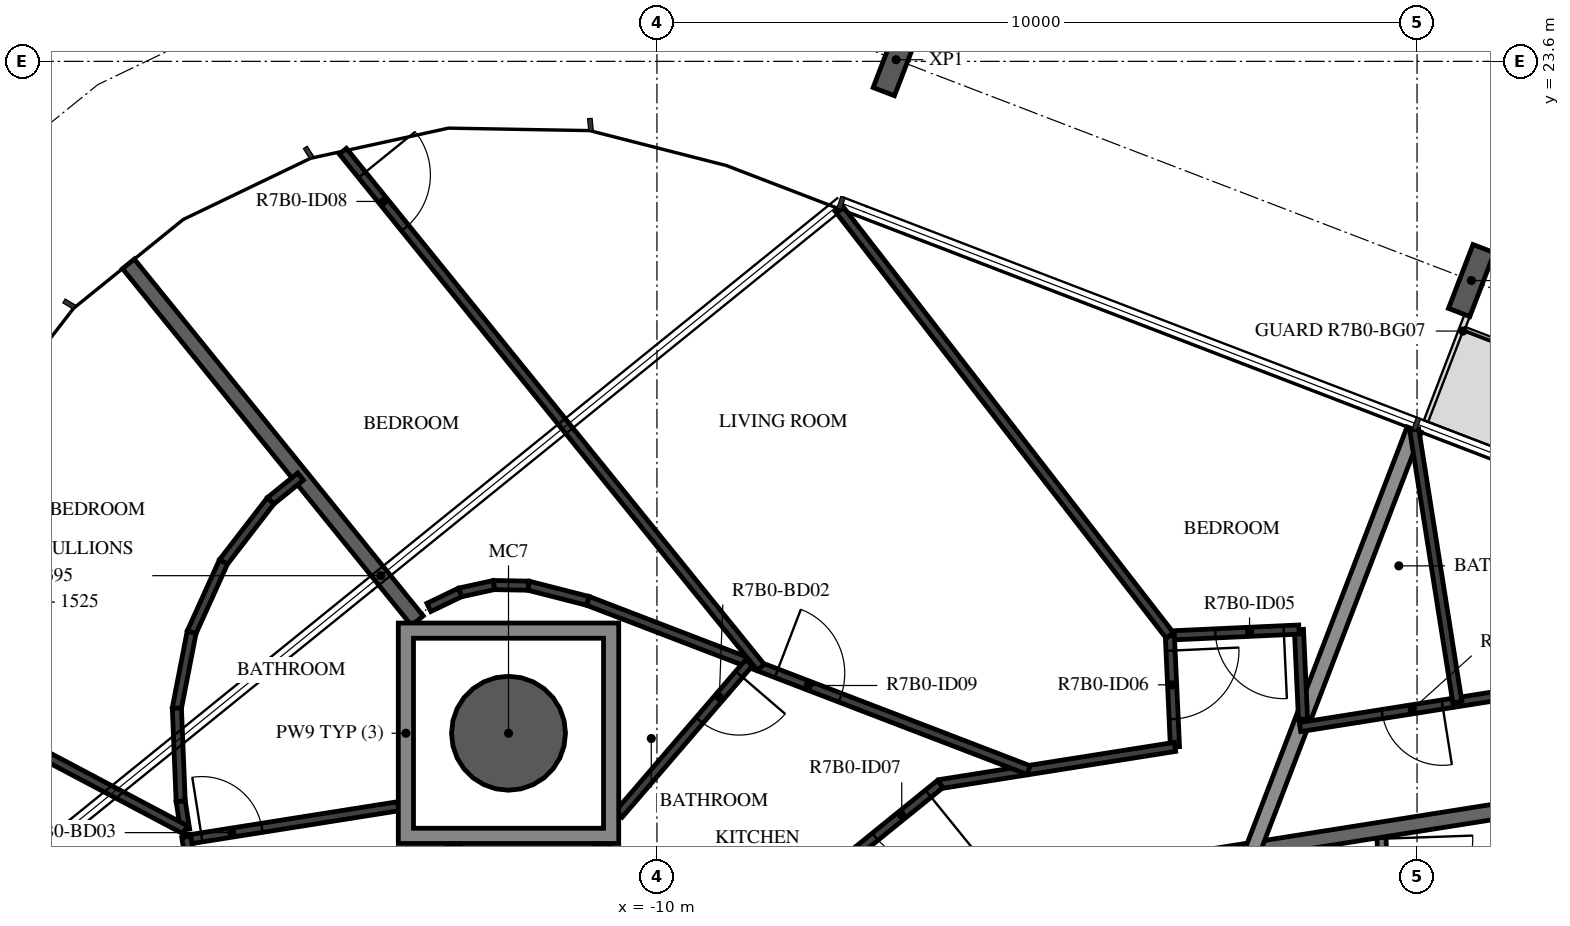
"""IFC4 building model, lengths in metres.
Left out: names, types, materials, properties, quantities, classifications, styles, units other than length and angle.
Written with IfcOpenShell. Run it as: python <this file> out.ifc"""

import sys

from ifc_helpers import new_model, si_unit, direction, frame, frame_2d, origin, origin_2d, place, context, subcontext, project, spatial, polyline, rectangle, hollow_circle, i_section, outline, extrude, element, fill, save


model = new_model("IFC4")
c1 = context("Model", 3, precision=1e-05, world=origin(), true_north=direction((0.0, 1.0)))
c2 = subcontext(c1, "Body", "Model", "MODEL_VIEW")
j1 = project(units=[si_unit("LENGTHUNIT", "METRE"), si_unit("PLANEANGLEUNIT", "RADIAN")], contexts=[c1])
p1 = place(None, origin())
s1 = spatial("IfcSite", under=j1, at=p1, CompositionType="ELEMENT")
p2 = place(p1, origin())
s2 = spatial("IfcBuilding", under=s1, at=p2, CompositionType="ELEMENT")
p3 = place(p2, frame((0.0, 0.0, 277.4)))
s3 = spatial("IfcBuildingStorey", under=s2, at=p3, CompositionType="ELEMENT", Elevation=277.4)
p4 = place(p3, frame((-11.953, 14.76, -0.38), z_axis=(0.0, 0.0, 1.0), x_axis=(1.0, 0.0, 0.0)))
e1 = element("IfcColumn", 1, at=p4, inside=s3, PredefinedType="COLUMN", context=c2, shape_type="SweptSolid", body=[
    extrude(hollow_circle(Radius=0.75, WallThickness=0.035, at=origin_2d()), origin(), (0.0, 0.0, 1.0), 3.5),
])
for number, where, z_axis, x_axis in (
    (2, (0.715, 20.716, -0.38), (0.0, 0.0, 1.0), (0.934, -0.358, 0.0)),
    (3, (-6.854, 23.622, -0.38), (0.0, 0.0, 1.0), (0.934, -0.358, 0.0)),
):
    element("IfcColumn", number, at=place(p3, frame(where, z_axis=z_axis, x_axis=x_axis)), inside=s3, PredefinedType="COLUMN", context=c2, shape_type="SweptSolid", body=[
        extrude(i_section(OverallWidth=0.3, OverallDepth=0.9, WebThickness=0.019, FlangeThickness=0.035, FilletRadius=0.03, at=origin_2d()), origin(), (0.0, 0.0, 1.0), 3.5),
    ])
p5 = place(p3, frame((-0.471, 13.492, 0.0), z_axis=(0.0, 0.0, 1.0), x_axis=(0.034873173869, -0.999391745886, 0.0)))
e4 = element("IfcWall", 4, at=p5, inside=s3, PredefinedType="PARTITIONING", context=c2, shape_type="SweptSolid", body=[
    extrude(rectangle(XDim=1.596, YDim=0.12, at=frame_2d((0.798, 0.0))), origin(), (0.0, 0.0, 1.0), 3.12),
])
p6 = place(p5, frame((0.12, 0.0, 0.0)))
e5 = element("IfcOpeningElement", 5, at=p6, cuts=e4, PredefinedType="OPENING", context=c2, shape_type="SweptSolid", body=[
    extrude(rectangle(XDim=1.2, YDim=2.1, at=frame_2d((0.6, 1.05))), frame((0.0, 0.07, 0.0), z_axis=(0.0, -1.0, 0.0), x_axis=(1.0, 0.0, 0.0)), (0.0, 0.0, 1.0), 0.14),
])
p7 = place(p3, frame((1.45, 13.797, 0.0), z_axis=(0.0, 0.0, 1.0), x_axis=(-0.987690361611, -0.156421704315, 0.0)))
e6 = element("IfcWall", 6, at=p7, inside=s3, PredefinedType="STANDARD", context=c2, shape_type="SweptSolid", body=[
    extrude(rectangle(XDim=7.181, YDim=0.2, at=frame_2d((3.591, 0.0))), origin(), (0.0, 0.0, 1.0), 3.12),
])
p8 = place(p3, frame((-0.037, 18.756, 0.0), z_axis=(0.0, 0.0, 1.0), x_axis=(-0.358365943542, -0.933581196527, 0.0)))
e7 = element("IfcWall", 7, at=p8, inside=s3, PredefinedType="STANDARD", context=c2, shape_type="SweptSolid", body=[
    extrude(rectangle(XDim=5.924, YDim=0.2, at=frame_2d((2.962, 0.0))), origin(), (0.0, 0.0, 1.0), 2.73),
])
p9 = place(p3, frame((-10.779, 13.31, 0.0), z_axis=(0.0, 0.0, 1.0), x_axis=(0.62931692753, -0.777148766147, 0.0)))
e8 = element("IfcWall", 8, at=p9, inside=s3, PredefinedType="STANDARD", context=c2, shape_type="SweptSolid", body=[
    extrude(rectangle(XDim=3.727, YDim=0.2, at=frame_2d((1.864, 0.0))), origin(), (0.0, 0.0, 1.0), 3.12),
])
p10 = place(p3, frame((-16.953, 20.936, 0.0), z_axis=(0.0, 0.0, 1.0), x_axis=(0.629347053134, -0.77712437017, 0.0)))
e9 = element("IfcWall", 9, at=p10, inside=s3, PredefinedType="STANDARD", context=c2, shape_type="SweptSolid", body=[
    extrude(rectangle(XDim=6.04, YDim=0.2, at=frame_2d((3.02, 0.0))), origin(), (0.0, 0.0, 1.0), 3.12),
])
p11 = place(p3, frame((1.612, 15.341, 0.0), z_axis=(0.0, 0.0, 1.0), x_axis=(-0.987687176419, -0.156441815179, 0.0)))
e10 = element("IfcWall", 10, at=p11, inside=s3, PredefinedType="PARTITIONING", context=c2, shape_type="SweptSolid", body=[
    extrude(rectangle(XDim=3.191, YDim=0.12, at=frame_2d((1.596, 0.0))), origin(), (0.0, 0.0, 1.0), 3.12),
])
p12 = place(p11, frame((1.295, 0.0, 0.0)))
e11 = element("IfcOpeningElement", 11, at=p12, cuts=e10, PredefinedType="OPENING", context=c2, shape_type="SweptSolid", body=[
    extrude(rectangle(XDim=0.8, YDim=2.1, at=frame_2d((0.4, 1.05))), frame((0.0, 0.07, 0.0), z_axis=(0.0, -1.0, 0.0), x_axis=(1.0, 0.0, 0.0)), (0.0, 0.0, 1.0), 0.14),
])
p13 = place(p3, frame((-0.037, 18.756, 0.0), z_axis=(0.0, 0.0, 1.0), x_axis=(0.156421851095, -0.987690338365, 0.0)))
e12 = element("IfcWall", 12, at=p13, inside=s3, PredefinedType="PARTITIONING", context=c2, shape_type="SweptSolid", body=[
    extrude(rectangle(XDim=3.63, YDim=0.12, at=frame_2d((1.815, 0.0))), origin(), (0.0, 0.0, 1.0), 3.12),
])
p14 = place(p3, frame((-1.5, 14.946, 0.0), z_axis=(0.0, 0.0, 1.0), x_axis=(-0.045923747874, 0.998944948123, 0.0)))
e13 = element("IfcWall", 13, at=p14, inside=s3, PredefinedType="PARTITIONING", context=c2, shape_type="SweptSolid", body=[
    extrude(rectangle(XDim=1.18, YDim=0.12, at=frame_2d((0.59, 0.0))), origin(), (0.0, 0.0, 1.0), 3.12),
])
p15 = place(p3, frame((-1.554, 16.125, 0.0), z_axis=(0.0, 0.0, 1.0), x_axis=(-0.998943517875, -0.045954848436, 0.0)))
e14 = element("IfcWall", 14, at=p15, inside=s3, PredefinedType="PARTITIONING", context=c2, shape_type="SweptSolid", body=[
    extrude(rectangle(XDim=1.7, YDim=0.12, at=frame_2d((0.85, 0.0))), origin(), (0.0, 0.0, 1.0), 3.12),
])
p16 = place(p15, frame((0.2, 0.0, 0.0)))
e15 = element("IfcOpeningElement", 15, at=p16, cuts=e14, PredefinedType="OPENING", context=c2, shape_type="SweptSolid", body=[
    extrude(rectangle(XDim=0.9, YDim=2.1, at=frame_2d((0.45, 1.05))), frame((0.0, 0.07, 0.0), z_axis=(0.0, -1.0, 0.0), x_axis=(1.0, 0.0, 0.0)), (0.0, 0.0, 1.0), 0.14),
])
p17 = place(p3, frame((-3.252, 16.047, 0.0), z_axis=(0.0, 0.0, 1.0), x_axis=(0.045928493331, -0.998944729953, 0.0)))
e16 = element("IfcWall", 16, at=p17, inside=s3, PredefinedType="PARTITIONING", context=c2, shape_type="SweptSolid", body=[
    extrude(rectangle(XDim=1.467, YDim=0.12, at=frame_2d((0.733, 0.0))), origin(), (0.0, 0.0, 1.0), 3.12),
])
p18 = place(p17, frame((0.2, 0.0, 0.0)))
e17 = element("IfcOpeningElement", 17, at=p18, cuts=e16, PredefinedType="OPENING", context=c2, shape_type="SweptSolid", body=[
    extrude(rectangle(XDim=0.9, YDim=2.1, at=frame_2d((0.45, 1.05))), frame((0.0, 0.07, 0.0), z_axis=(0.0, -1.0, 0.0), x_axis=(1.0, 0.0, 0.0)), (0.0, 0.0, 1.0), 0.14),
])
p19 = place(p3, frame((-3.185, 14.581, 0.0), z_axis=(0.0, 0.0, 1.0), x_axis=(-0.987690712769, -0.156419486991, 0.0)))
e18 = element("IfcWall", 18, at=p19, inside=s3, PredefinedType="PARTITIONING", context=c2, shape_type="SweptSolid", body=[
    extrude(rectangle(XDim=3.128, YDim=0.12, at=frame_2d((1.564, 0.0))), origin(), (0.0, 0.0, 1.0), 3.12),
])
p20 = place(p3, frame((-6.274, 14.092, 0.0), z_axis=(0.0, 0.0, 1.0), x_axis=(-0.777162268892, -0.629300252511, 0.0)))
e19 = element("IfcWall", 19, at=p20, inside=s3, PredefinedType="PARTITIONING", context=c2, shape_type="SweptSolid", body=[
    extrude(rectangle(XDim=3.992, YDim=0.12, at=frame_2d((1.996, 0.0))), origin(), (0.0, 0.0, 1.0), 3.12),
])
p21 = place(p20, frame((0.2, 0.0, 0.0)))
e20 = element("IfcOpeningElement", 20, at=p21, cuts=e19, PredefinedType="OPENING", context=c2, shape_type="SweptSolid", body=[
    extrude(rectangle(XDim=0.9, YDim=2.1, at=frame_2d((0.45, 1.05))), frame((0.0, 0.07, 0.0), z_axis=(0.0, -1.0, 0.0), x_axis=(1.0, 0.0, 0.0)), (0.0, 0.0, 1.0), 0.14),
])
p22 = place(p3, frame((-7.606, 21.661, 0.0), z_axis=(0.0, 0.0, 1.0), x_axis=(0.612852858705, -0.79019704731, 0.0)))
e21 = element("IfcWall", 21, at=p22, inside=s3, PredefinedType="PARTITIONING", context=c2, shape_type="SweptSolid", body=[
    extrude(rectangle(XDim=7.105, YDim=0.12, at=frame_2d((3.552, 0.0))), origin(), (0.0, 0.0, 1.0), 3.12),
])
p23 = place(p3, frame((-10.91, 16.502, 0.0), z_axis=(0.0, 0.0, 1.0), x_axis=(0.933584453869, -0.358357457707, 0.0)))
e22 = element("IfcWall", 22, at=p23, inside=s3, PredefinedType="PARTITIONING", context=c2, shape_type="SweptSolid", body=[
    extrude(rectangle(XDim=6.212, YDim=0.12, at=frame_2d((3.106, 0.0))), origin(), (0.0, 0.0, 1.0), 3.12),
])
p24 = place(p23, frame((2.657, 0.0, 0.0)))
e23 = element("IfcOpeningElement", 23, at=p24, cuts=e22, PredefinedType="OPENING", context=c2, shape_type="SweptSolid", body=[
    extrude(rectangle(XDim=0.9, YDim=2.1, at=frame_2d((0.45, 1.05))), frame((0.0, 0.07, 0.0), z_axis=(0.0, -1.0, 0.0), x_axis=(1.0, 0.0, 0.0)), (0.0, 0.0, 1.0), 0.14),
])
p25 = place(p3, frame((-14.132, 22.418, 0.0), z_axis=(0.0, 0.0, 1.0), x_axis=(0.629309172704, -0.77715504576, 0.0)))
e24 = element("IfcWall", 24, at=p25, inside=s3, PredefinedType="PARTITIONING", context=c2, shape_type="SweptSolid", body=[
    extrude(rectangle(XDim=8.736, YDim=0.12, at=frame_2d((4.368, 0.0))), origin(), (0.0, 0.0, 1.0), 3.12),
])
p26 = place(p25, frame((0.4, 0.0, 0.0)))
e25 = element("IfcOpeningElement", 25, at=p26, cuts=e24, PredefinedType="OPENING", context=c2, shape_type="SweptSolid", body=[
    extrude(rectangle(XDim=0.9, YDim=2.1, at=frame_2d((0.45, 1.05))), frame((0.0, 0.07, 0.0), z_axis=(0.0, -1.0, 0.0), x_axis=(1.0, 0.0, 0.0)), (0.0, 0.0, 1.0), 0.14),
])
p27 = place(p3, frame((-8.788, 15.688, 0.0), z_axis=(0.0, 0.0, 1.0), x_axis=(-0.652090514391, -0.758141122115, 0.0)))
e26 = element("IfcWall", 26, at=p27, inside=s3, PredefinedType="PARTITIONING", context=c2, shape_type="SweptSolid", body=[
    extrude(rectangle(XDim=2.629, YDim=0.12, at=frame_2d((1.314, 0.0))), origin(), (0.0, 0.0, 1.0), 3.12),
])
p28 = place(p27, frame((0.2, 0.0, 0.0)))
e27 = element("IfcOpeningElement", 27, at=p28, cuts=e26, PredefinedType="OPENING", context=c2, shape_type="SweptSolid", body=[
    extrude(rectangle(XDim=0.8, YDim=2.1, at=frame_2d((0.4, 1.05))), frame((0.0, 0.07, 0.0), z_axis=(0.0, -1.0, 0.0), x_axis=(1.0, 0.0, 0.0)), (0.0, 0.0, 1.0), 0.14),
])
p29 = place(p3, frame((-10.91, 16.502, 0.0), z_axis=(0.0, 0.0, 1.0), x_axis=(-0.96886520615, 0.247588796823, 0.0)))
e28 = element("IfcWall", 28, at=p29, inside=s3, PredefinedType="PARTITIONING", context=c2, shape_type="SweptSolid", body=[
    extrude(rectangle(XDim=0.807, YDim=0.12, at=frame_2d((0.403, 0.0))), origin(), (0.0, 0.0, 1.0), 3.12),
])
p30 = place(p3, frame((-11.691, 16.702, 0.0), z_axis=(0.0, 0.0, 1.0), x_axis=(-0.999843155249, 0.017710587291, 0.0)))
e29 = element("IfcWall", 29, at=p30, inside=s3, PredefinedType="PARTITIONING", context=c2, shape_type="SweptSolid", body=[
    extrude(rectangle(XDim=0.455, YDim=0.12, at=frame_2d((0.228, 0.0))), origin(), (0.0, 0.0, 1.0), 3.12),
])
p31 = place(p3, frame((-12.146, 16.71, 0.0), z_axis=(0.0, 0.0, 1.0), x_axis=(-0.976826470165, -0.21403281801, 0.0)))
e30 = element("IfcWall", 30, at=p31, inside=s3, PredefinedType="PARTITIONING", context=c2, shape_type="SweptSolid", body=[
    extrude(rectangle(XDim=0.455, YDim=0.12, at=frame_2d((0.228, 0.0))), origin(), (0.0, 0.0, 1.0), 3.12),
])
p32 = place(p3, frame((-12.591, 16.613, 0.0), z_axis=(0.0, 0.0, 1.0), x_axis=(-0.901405666701, -0.432975546699, 0.0)))
e31 = element("IfcWall", 31, at=p32, inside=s3, PredefinedType="PARTITIONING", context=c2, shape_type="SweptSolid", body=[
    extrude(rectangle(XDim=0.455, YDim=0.12, at=frame_2d((0.227, 0.0))), origin(), (0.0, 0.0, 1.0), 3.12),
])
p33 = place(p3, frame((-12.616, 13.311, 0.0), z_axis=(0.0, 0.0, 1.0), x_axis=(-0.7771657422, -0.629295963082, 0.0)))
e32 = element("IfcWall", 32, at=p33, inside=s3, PredefinedType="PARTITIONING", context=c2, shape_type="SweptSolid", body=[
    extrude(rectangle(XDim=1.653, YDim=0.12, at=frame_2d((0.826, 0.0))), origin(), (0.0, 0.0, 1.0), 3.12),
])
p34 = place(p3, frame((-14.688, 18.138, 0.0), z_axis=(0.0, 0.0, 1.0), x_axis=(-0.777009819755, -0.629488474879, 0.0)))
e33 = element("IfcWall", 33, at=p34, inside=s3, PredefinedType="PARTITIONING", context=c2, shape_type="SweptSolid", body=[
    extrude(rectangle(XDim=0.508, YDim=0.12, at=frame_2d((0.254, 0.0))), origin(), (0.0, 0.0, 1.0), 3.12),
])
p35 = place(p3, frame((-15.083, 17.818, 0.0), z_axis=(0.0, 0.0, 1.0), x_axis=(-0.611091802574, -0.791559731686, 0.0)))
e34 = element("IfcWall", 34, at=p35, inside=s3, PredefinedType="PARTITIONING", context=c2, shape_type="SweptSolid", body=[
    extrude(rectangle(XDim=1.016, YDim=0.12, at=frame_2d((0.508, 0.0))), origin(), (0.0, 0.0, 1.0), 3.12),
])
p36 = place(p3, frame((-15.703, 17.014, 0.0), z_axis=(0.0, 0.0, 1.0), x_axis=(-0.411973085874, -0.911196014322, 0.0)))
e35 = element("IfcWall", 35, at=p36, inside=s3, PredefinedType="PARTITIONING", context=c2, shape_type="SweptSolid", body=[
    extrude(rectangle(XDim=1.016, YDim=0.12, at=frame_2d((0.508, 0.0))), origin(), (0.0, 0.0, 1.0), 3.12),
])
p37 = place(p3, frame((-16.122, 16.088, 0.0), z_axis=(0.0, 0.0, 1.0), x_axis=(-0.191030445301, -0.981584112019, 0.0)))
e36 = element("IfcWall", 36, at=p37, inside=s3, PredefinedType="PARTITIONING", context=c2, shape_type="SweptSolid", body=[
    extrude(rectangle(XDim=1.016, YDim=0.12, at=frame_2d((0.508, 0.0))), origin(), (0.0, 0.0, 1.0), 3.12),
])
p38 = place(p3, frame((-16.316, 15.091, 0.0), z_axis=(0.0, 0.0, 1.0), x_axis=(0.040786423131, -0.999167887639, 0.0)))
e37 = element("IfcWall", 37, at=p38, inside=s3, PredefinedType="PARTITIONING", context=c2, shape_type="SweptSolid", body=[
    extrude(rectangle(XDim=1.227, YDim=0.12, at=frame_2d((0.614, 0.0))), origin(), (0.0, 0.0, 1.0), 3.12),
])
p39 = place(p3, frame((-16.266, 13.865, 0.0), z_axis=(0.0, 0.0, 1.0), x_axis=(0.156757556272, -0.987637113798, 0.0)))
e38 = element("IfcWall", 38, at=p39, inside=s3, PredefinedType="PARTITIONING", context=c2, shape_type="SweptSolid", body=[
    extrude(rectangle(XDim=0.378, YDim=0.12, at=frame_2d((0.189, 0.0))), origin(), (0.0, 0.0, 1.0), 3.12),
])
p40 = place(p3, frame((-16.186, 13.359, 0.0), z_axis=(0.0, 0.0, 1.0), x_axis=(0.987680631298, 0.156483131865, 0.0)))
e39 = element("IfcWall", 39, at=p40, inside=s3, PredefinedType="PARTITIONING", context=c2, shape_type="SweptSolid", body=[
    extrude(rectangle(XDim=2.818, YDim=0.12, at=frame_2d((1.409, 0.0))), origin(), (0.0, 0.0, 1.0), 3.12),
])
p41 = place(p40, frame((0.2, 0.0, 0.0)))
e40 = element("IfcOpeningElement", 40, at=p41, cuts=e39, PredefinedType="OPENING", context=c2, shape_type="SweptSolid", body=[
    extrude(rectangle(XDim=0.8, YDim=2.1, at=frame_2d((0.4, 1.05))), frame((0.0, 0.07, 0.0), z_axis=(0.0, -1.0, 0.0), x_axis=(1.0, 0.0, 0.0)), (0.0, 0.0, 1.0), 0.14),
])
p42 = place(p3, frame((-19.913, 15.454, 0.0), z_axis=(0.0, 0.0, 1.0), x_axis=(0.883751094582, -0.467957266024, 0.0)))
e41 = element("IfcWall", 41, at=p42, inside=s3, PredefinedType="PARTITIONING", context=c2, shape_type="SweptSolid", body=[
    extrude(rectangle(XDim=4.194, YDim=0.12, at=frame_2d((2.097, 0.0))), origin(), (0.0, 0.0, 1.0), 3.12),
])
p43 = place(p42, frame((0.4, 0.0, 0.0)))
e42 = element("IfcOpeningElement", 42, at=p43, cuts=e41, PredefinedType="OPENING", context=c2, shape_type="SweptSolid", body=[
    extrude(rectangle(XDim=0.9, YDim=2.1, at=frame_2d((0.45, 1.05))), frame((0.0, 0.07, 0.0), z_axis=(0.0, -1.0, 0.0), x_axis=(1.0, 0.0, 0.0)), (0.0, 0.0, 1.0), 0.14),
])
p44 = place(p3, frame((-16.192, 13.399, 0.0), z_axis=(0.0, 0.0, 1.0), x_axis=(0.156405047803, -0.987692999379, 0.0)))
e43 = element("IfcWall", 43, at=p44, inside=s3, PredefinedType="PARTITIONING", context=c2, shape_type="SweptSolid", body=[
    extrude(rectangle(XDim=9.01, YDim=0.12, at=frame_2d((4.505, 0.0))), origin(), (0.0, 0.0, 1.0), 3.12),
])
p45 = place(p44, frame((0.6, 0.0, 0.0)))
e44 = element("IfcOpeningElement", 44, at=p45, cuts=e43, PredefinedType="OPENING", context=c2, shape_type="SweptSolid", body=[
    extrude(rectangle(XDim=0.9, YDim=2.1, at=frame_2d((0.45, 1.05))), frame((0.0, 0.07, 0.0), z_axis=(0.0, -1.0, 0.0), x_axis=(1.0, 0.0, 0.0)), (0.0, 0.0, 1.0), 0.14),
])
p46 = place(p44, frame((4.725, 0.0, 0.0)))
e45 = element("IfcOpeningElement", 45, at=p46, cuts=e43, PredefinedType="OPENING", context=c2, shape_type="SweptSolid", body=[
    extrude(rectangle(XDim=0.9, YDim=2.1, at=frame_2d((0.45, 1.05))), frame((0.0, 0.07, 0.0), z_axis=(0.0, -1.0, 0.0), x_axis=(1.0, 0.0, 0.0)), (0.0, 0.0, 1.0), 0.14),
])
p47 = place(p3, origin())
e46 = element("IfcWall", 46, at=p47, inside=s3, PredefinedType="STANDARD", context=c2, shape_type="SweptSolid", body=[
    extrude(outline(polyline([(-10.503, 16.21), (-10.503, 13.311), (-13.403, 13.311), (-13.403, 16.21), (-10.503, 16.21)]), holes=[polyline([(-13.203, 13.51), (-10.703, 13.51), (-10.703, 16.01), (-13.203, 16.01), (-13.203, 13.51)])]), origin(), (0.0, 0.0, 1.0), 3.12),
])
p48 = place(p12, origin())
e47 = element("IfcDoor", 47, at=p48, inside=s3, OperationType="SINGLE_SWING_RIGHT", PredefinedType="DOOR", context=c2, shape_type="SweptSolid", body=[
    extrude(rectangle(XDim=0.8, YDim=2.1, at=frame_2d((0.4, 1.05))), frame((0.0, 0.025, 0.0), z_axis=(0.0, -1.0, 0.0), x_axis=(1.0, 0.0, 0.0)), (0.0, 0.0, 1.0), 0.05),
])
fill(e11, e47)
p49 = place(p16, origin())
e48 = element("IfcDoor", 48, at=p49, inside=s3, OperationType="SINGLE_SWING_RIGHT", PredefinedType="DOOR", context=c2, shape_type="SweptSolid", body=[
    extrude(rectangle(XDim=0.9, YDim=2.1, at=frame_2d((0.45, 1.05))), frame((0.0, 0.025, 0.0), z_axis=(0.0, -1.0, 0.0), x_axis=(1.0, 0.0, 0.0)), (0.0, 0.0, 1.0), 0.05),
])
fill(e15, e48)
p50 = place(p18, origin())
e49 = element("IfcDoor", 49, at=p50, inside=s3, OperationType="SINGLE_SWING_LEFT", PredefinedType="DOOR", context=c2, shape_type="SweptSolid", body=[
    extrude(rectangle(XDim=0.9, YDim=2.1, at=frame_2d((0.45, 1.05))), frame((0.0, 0.025, 0.0), z_axis=(0.0, -1.0, 0.0), x_axis=(1.0, 0.0, 0.0)), (0.0, 0.0, 1.0), 0.05),
])
fill(e17, e49)
p51 = place(p21, origin())
e50 = element("IfcDoor", 50, at=p51, inside=s3, OperationType="SINGLE_SWING_RIGHT", PredefinedType="DOOR", context=c2, shape_type="SweptSolid", body=[
    extrude(rectangle(XDim=0.9, YDim=2.1, at=frame_2d((0.45, 1.05))), frame((0.0, 0.025, 0.0), z_axis=(0.0, -1.0, 0.0), x_axis=(1.0, 0.0, 0.0)), (0.0, 0.0, 1.0), 0.05),
])
fill(e20, e50)
p52 = place(p28, origin())
e51 = element("IfcDoor", 51, at=p52, inside=s3, OperationType="SINGLE_SWING_RIGHT", PredefinedType="DOOR", context=c2, shape_type="SweptSolid", body=[
    extrude(rectangle(XDim=0.8, YDim=2.1, at=frame_2d((0.4, 1.05))), frame((0.0, 0.025, 0.0), z_axis=(0.0, -1.0, 0.0), x_axis=(1.0, 0.0, 0.0)), (0.0, 0.0, 1.0), 0.05),
])
fill(e27, e51)
p53 = place(p26, origin())
e52 = element("IfcDoor", 52, at=p53, inside=s3, OperationType="SINGLE_SWING_RIGHT", PredefinedType="DOOR", context=c2, shape_type="SweptSolid", body=[
    extrude(rectangle(XDim=0.9, YDim=2.1, at=frame_2d((0.45, 1.05))), frame((0.0, 0.025, 0.0), z_axis=(0.0, -1.0, 0.0), x_axis=(1.0, 0.0, 0.0)), (0.0, 0.0, 1.0), 0.05),
])
fill(e25, e52)
p54 = place(p24, origin())
e53 = element("IfcDoor", 53, at=p54, inside=s3, OperationType="SINGLE_SWING_LEFT", PredefinedType="DOOR", context=c2, shape_type="SweptSolid", body=[
    extrude(rectangle(XDim=0.9, YDim=2.1, at=frame_2d((0.45, 1.05))), frame((0.0, 0.025, 0.0), z_axis=(0.0, -1.0, 0.0), x_axis=(1.0, 0.0, 0.0)), (0.0, 0.0, 1.0), 0.05),
])
fill(e23, e53)
p55 = place(p41, origin())
e54 = element("IfcDoor", 54, at=p55, inside=s3, OperationType="SINGLE_SWING_LEFT", PredefinedType="DOOR", context=c2, shape_type="SweptSolid", body=[
    extrude(rectangle(XDim=0.8, YDim=2.1, at=frame_2d((0.4, 1.05))), frame((0.0, 0.025, 0.0), z_axis=(0.0, -1.0, 0.0), x_axis=(1.0, 0.0, 0.0)), (0.0, 0.0, 1.0), 0.05),
])
fill(e40, e54)
p56 = place(p6, origin())
e55 = element("IfcDoor", 55, at=p56, inside=s3, OperationType="DOUBLE_DOOR_SINGLE_SWING", PredefinedType="DOOR", context=c2, shape_type="SweptSolid", body=[
    extrude(rectangle(XDim=1.2, YDim=2.1, at=frame_2d((0.6, 1.05))), frame((0.0, 0.025, 0.0), z_axis=(0.0, -1.0, 0.0), x_axis=(1.0, 0.0, 0.0)), (0.0, 0.0, 1.0), 0.05),
])
fill(e5, e55)
save(model, sys.argv[1])
